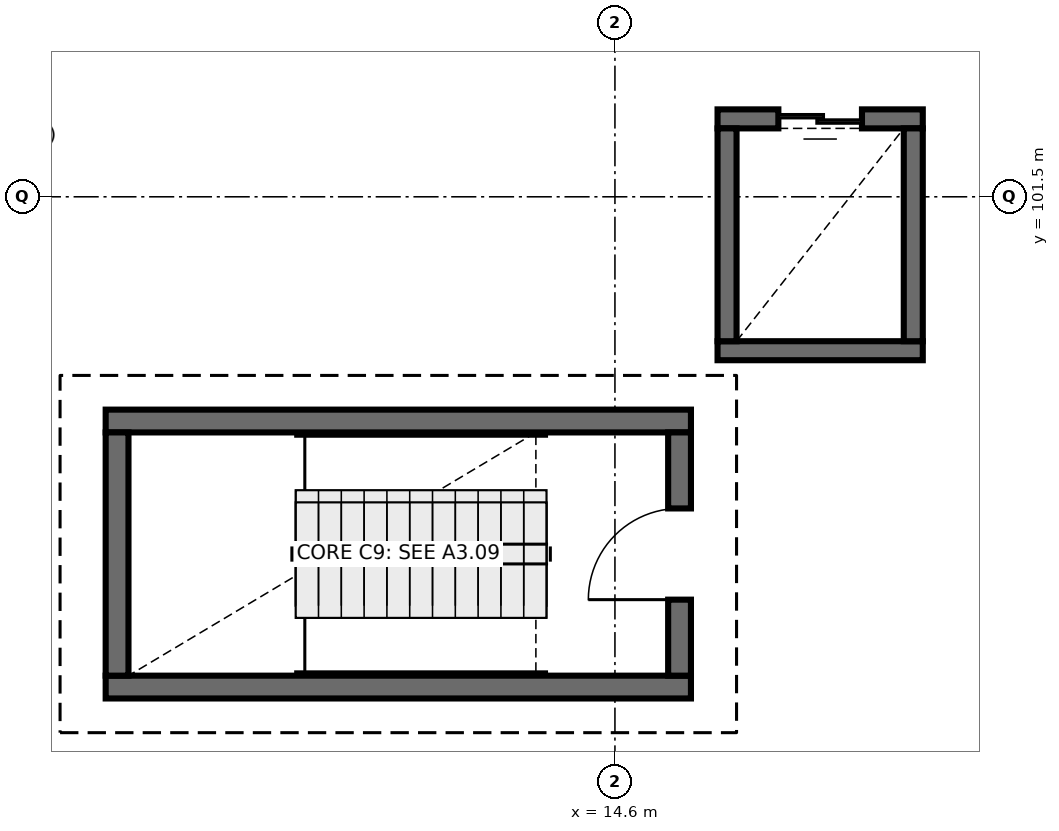
"""IFC4 building model, lengths in metres.
Left out: names, types, materials, properties, quantities, classifications, styles, units other than length and angle.
Written with IfcOpenShell. Run it as: python <this file> out.ifc"""

import sys

from ifc_helpers import new_model, si_unit, direction, frame, frame_2d, origin, place, context, subcontext, project, spatial, rectangle, extrude, element, fill, save


model = new_model("IFC4")
c1 = context("Model", 3, precision=1e-05, world=origin(), true_north=direction((0.0, 1.0)))
c2 = subcontext(c1, "Body", "Model", "MODEL_VIEW")
j1 = project(units=[si_unit("LENGTHUNIT", "METRE"), si_unit("PLANEANGLEUNIT", "RADIAN")], contexts=[c1])
p1 = place(None, origin())
s1 = spatial("IfcSite", under=j1, at=p1, CompositionType="ELEMENT")
p2 = place(p1, origin())
s2 = spatial("IfcBuilding", under=s1, at=p2, CompositionType="ELEMENT")
p3 = place(p2, frame((0.0, 0.0, 4.8)))
s3 = spatial("IfcBuildingStorey", under=s2, at=p3, CompositionType="ELEMENT", Elevation=4.8)
for number, where, z_axis, x_axis in (
    (1, (7.9, 95.05, 0.0), (0.0, 0.0, 1.0), (1.0, 0.0, 0.0)),
    (2, (15.6, 98.55, 0.0), (0.0, 0.0, 1.0), (-1.0, 0.0, 0.0)),
):
    element("IfcWall", number, at=place(p3, frame(where, z_axis=z_axis, x_axis=x_axis)), inside=s3, PredefinedType="SHEAR", context=c2, shape_type="SweptSolid", body=[
        extrude(rectangle(XDim=7.7, YDim=0.3, at=frame_2d((3.85, 0.0))), origin(), (0.0, 0.0, 1.0), 4.5),
    ])
p4 = place(p3, frame((8.05, 98.4, 0.0), z_axis=(0.0, 0.0, 1.0), x_axis=(0.0, -1.0, 0.0)))
e3 = element("IfcWall", 3, at=p4, inside=s3, PredefinedType="SHEAR", context=c2, shape_type="SweptSolid", body=[
    extrude(rectangle(XDim=3.2, YDim=0.3, at=frame_2d((1.6, 0.0))), origin(), (0.0, 0.0, 1.0), 4.5),
])
p5 = place(p3, frame((15.45, 95.2, 0.0), z_axis=(0.0, 0.0, 1.0), x_axis=(0.0, 1.0, 0.0)))
e4 = element("IfcWall", 4, at=p5, inside=s3, PredefinedType="SHEAR", context=c2, shape_type="SweptSolid", body=[
    extrude(rectangle(XDim=3.2, YDim=0.3, at=frame_2d((1.6, 0.0))), origin(), (0.0, 0.0, 1.0), 4.5),
])
p6 = place(p5, frame((1.0, 0.0, 0.0)))
e5 = element("IfcOpeningElement", 5, at=p6, cuts=e4, PredefinedType="OPENING", context=c2, shape_type="SweptSolid", body=[
    extrude(rectangle(XDim=1.2, YDim=2.15, at=frame_2d((0.6, 1.075))), frame((0.0, 0.16, 0.0), z_axis=(0.0, -1.0, 0.0), x_axis=(1.0, 0.0, 0.0)), (0.0, 0.0, 1.0), 0.32),
])
p7 = place(p3, frame((15.95, 99.475, 0.0), z_axis=(0.0, 0.0, 1.0), x_axis=(1.0, 0.0, 0.0)))
e6 = element("IfcWall", 6, at=p7, inside=s3, PredefinedType="SHEAR", context=c2, shape_type="SweptSolid", body=[
    extrude(rectangle(XDim=2.7, YDim=0.25, at=frame_2d((1.35, 0.0))), origin(), (0.0, 0.0, 1.0), 4.5),
])
p8 = place(p3, frame((18.65, 102.525, 0.0), z_axis=(0.0, 0.0, 1.0), x_axis=(-1.0, 0.0, 0.0)))
e7 = element("IfcWall", 7, at=p8, inside=s3, PredefinedType="SHEAR", context=c2, shape_type="SweptSolid", body=[
    extrude(rectangle(XDim=2.7, YDim=0.25, at=frame_2d((1.35, 0.0))), origin(), (0.0, 0.0, 1.0), 4.5),
])
p9 = place(p8, frame((0.8, 0.0, 0.0)))
e8 = element("IfcOpeningElement", 8, at=p9, cuts=e7, PredefinedType="OPENING", context=c2, shape_type="SweptSolid", body=[
    extrude(rectangle(XDim=1.1, YDim=2.15, at=frame_2d((0.55, 1.075))), frame((0.0, 0.135, 0.0), z_axis=(0.0, -1.0, 0.0), x_axis=(1.0, 0.0, 0.0)), (0.0, 0.0, 1.0), 0.27),
])
for number, where, z_axis, x_axis in (
    (9, (16.075, 102.4, 0.0), (0.0, 0.0, 1.0), (0.0, -1.0, 0.0)),
    (10, (18.525, 99.6, 0.0), (0.0, 0.0, 1.0), (0.0, 1.0, 0.0)),
):
    element("IfcWall", number, at=place(p3, frame(where, z_axis=z_axis, x_axis=x_axis)), inside=s3, PredefinedType="SHEAR", context=c2, shape_type="SweptSolid", body=[
        extrude(rectangle(XDim=2.8, YDim=0.25, at=frame_2d((1.4, 0.0))), origin(), (0.0, 0.0, 1.0), 4.5),
    ])
p10 = place(p6, origin())
e11 = element("IfcDoor", 11, at=p10, inside=s3, OperationType="SINGLE_SWING_LEFT", PredefinedType="DOOR", context=c2, shape_type="SweptSolid", body=[
    extrude(rectangle(XDim=1.2, YDim=2.15, at=frame_2d((0.6, 1.075))), frame((0.0, 0.025, 0.0), z_axis=(0.0, -1.0, 0.0), x_axis=(1.0, 0.0, 0.0)), (0.0, 0.0, 1.0), 0.05),
])
fill(e5, e11)
p11 = place(p9, origin())
e12 = element("IfcDoor", 12, at=p11, inside=s3, OperationType="DOUBLE_DOOR_SLIDING", PredefinedType="DOOR", context=c2, shape_type="SweptSolid", body=[
    extrude(rectangle(XDim=1.1, YDim=2.15, at=frame_2d((0.55, 1.075))), frame((0.0, 0.025, 0.0), z_axis=(0.0, -1.0, 0.0), x_axis=(1.0, 0.0, 0.0)), (0.0, 0.0, 1.0), 0.05),
])
fill(e8, e12)
save(model, sys.argv[1])
